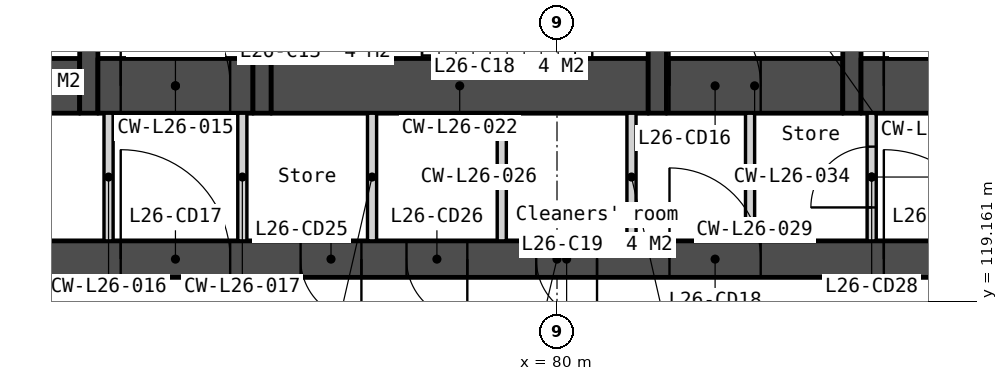
"""IFC4 building model, lengths in metres.
Left out: names, types, materials, properties, quantities, classifications, styles, units other than length and angle.
Written with IfcOpenShell. Run it as: python <this file> out.ifc"""

import sys

from ifc_helpers import new_model, si_unit, direction, frame, frame_2d, origin, place, context, subcontext, project, spatial, polyline, rectangle, outline, extrude, element, fill, save


model = new_model("IFC4")
c1 = context("Model", 3, precision=1e-05, world=origin(), true_north=direction((0.0, 1.0)))
c2 = subcontext(c1, "Body", "Model", "MODEL_VIEW")
j1 = project(units=[si_unit("LENGTHUNIT", "METRE"), si_unit("PLANEANGLEUNIT", "RADIAN")], contexts=[c1])
p1 = place(None, origin())
s1 = spatial("IfcSite", under=j1, at=p1, CompositionType="ELEMENT")
p2 = place(p1, origin())
s2 = spatial("IfcBuilding", under=s1, at=p2, CompositionType="ELEMENT")
p3 = place(p2, frame((0.0, 0.0, 106.3)))
s3 = spatial("IfcBuildingStorey", under=s2, at=p3, CompositionType="ELEMENT", Elevation=106.3)
p4 = place(p3, frame((66.0, 119.85, 0.0), z_axis=(0.0, 0.0, 1.0), x_axis=(1.0, 0.0, 0.0)))
e1 = element("IfcWall", 1, at=p4, inside=s3, PredefinedType="SOLIDWALL", context=c2, shape_type="SweptSolid", body=[
    extrude(rectangle(XDim=28.0, YDim=0.6, at=frame_2d((14.0, 0.0))), origin(), (0.0, 0.0, 1.0), 3.35),
])
p5 = place(p4, frame((6.825, 0.0, 0.0)))
e2 = element("IfcOpeningElement", 2, at=p5, cuts=e1, PredefinedType="OPENING", context=c2, shape_type="SweptSolid", body=[
    extrude(rectangle(XDim=1.8, YDim=2.1, at=frame_2d((0.9, 1.05))), frame((0.0, 0.31, 0.0), z_axis=(0.0, -1.0, 0.0), x_axis=(1.0, 0.0, 0.0)), (0.0, 0.0, 1.0), 0.62),
])
p6 = place(p4, frame((15.85, 0.0, 0.0)))
e3 = element("IfcOpeningElement", 3, at=p6, cuts=e1, PredefinedType="OPENING", context=c2, shape_type="SweptSolid", body=[
    extrude(rectangle(XDim=1.5, YDim=2.1, at=frame_2d((0.75, 1.05))), frame((0.0, 0.31, 0.0), z_axis=(0.0, -1.0, 0.0), x_axis=(1.0, 0.0, 0.0)), (0.0, 0.0, 1.0), 0.62),
])
p7 = place(p4, frame((19.375, 0.0, 0.0)))
e4 = element("IfcOpeningElement", 4, at=p7, cuts=e1, PredefinedType="OPENING", context=c2, shape_type="SweptSolid", body=[
    extrude(rectangle(XDim=1.8, YDim=2.1, at=frame_2d((0.9, 1.05))), frame((0.0, 0.31, 0.0), z_axis=(0.0, -1.0, 0.0), x_axis=(1.0, 0.0, 0.0)), (0.0, 0.0, 1.0), 0.62),
])
p8 = place(p4, frame((4.425, 0.0, 0.0)))
e5 = element("IfcOpeningElement", 5, at=p8, cuts=e1, PredefinedType="OPENING", context=c2, shape_type="SweptSolid", body=[
    extrude(rectangle(XDim=1.0, YDim=2.1, at=frame_2d((0.5, 1.05))), frame((0.0, 0.31, 0.0), z_axis=(0.0, -1.0, 0.0), x_axis=(1.0, 0.0, 0.0)), (0.0, 0.0, 1.0), 0.62),
])
p9 = place(p4, frame((9.783, 0.0, 0.0)))
e6 = element("IfcOpeningElement", 6, at=p9, cuts=e1, PredefinedType="OPENING", context=c2, shape_type="SweptSolid", body=[
    extrude(rectangle(XDim=1.0, YDim=2.1, at=frame_2d((0.5, 1.05))), frame((0.0, 0.31, 0.0), z_axis=(0.0, -1.0, 0.0), x_axis=(1.0, 0.0, 0.0)), (0.0, 0.0, 1.0), 0.62),
])
p10 = place(p4, frame((11.525, 0.0, 0.0)))
e7 = element("IfcOpeningElement", 7, at=p10, cuts=e1, PredefinedType="OPENING", context=c2, shape_type="SweptSolid", body=[
    extrude(rectangle(XDim=1.0, YDim=2.1, at=frame_2d((0.5, 1.05))), frame((0.0, 0.31, 0.0), z_axis=(0.0, -1.0, 0.0), x_axis=(1.0, 0.0, 0.0)), (0.0, 0.0, 1.0), 0.62),
])
p11 = place(p4, frame((13.658, 0.0, 0.0)))
e8 = element("IfcOpeningElement", 8, at=p11, cuts=e1, PredefinedType="OPENING", context=c2, shape_type="SweptSolid", body=[
    extrude(rectangle(XDim=1.0, YDim=2.1, at=frame_2d((0.5, 1.05))), frame((0.0, 0.31, 0.0), z_axis=(0.0, -1.0, 0.0), x_axis=(1.0, 0.0, 0.0)), (0.0, 0.0, 1.0), 0.62),
])
p12 = place(p4, frame((22.575, 0.0, 0.0)))
e9 = element("IfcOpeningElement", 9, at=p12, cuts=e1, PredefinedType="OPENING", context=c2, shape_type="SweptSolid", body=[
    extrude(rectangle(XDim=1.0, YDim=2.1, at=frame_2d((0.5, 1.05))), frame((0.0, 0.31, 0.0), z_axis=(0.0, -1.0, 0.0), x_axis=(1.0, 0.0, 0.0)), (0.0, 0.0, 1.0), 0.62),
])
p13 = place(p3, frame((69.6, 122.7, 0.0), z_axis=(0.0, 0.0, 1.0), x_axis=(1.0, 0.0, 0.0)))
e10 = element("IfcWall", 10, at=p13, inside=s3, PredefinedType="SOLIDWALL", context=c2, shape_type="SweptSolid", body=[
    extrude(rectangle(XDim=2.55, YDim=0.9, at=frame_2d((1.275, 0.0))), origin(), (0.0, 0.0, 1.0), 3.35),
])
p14 = place(p3, frame((72.3, 133.95, 0.0), z_axis=(0.0, 0.0, 1.0), x_axis=(0.0, -1.0, 0.0)))
e11 = element("IfcWall", 11, at=p14, inside=s3, PredefinedType="SOLIDWALL", context=c2, shape_type="SweptSolid", body=[
    extrude(rectangle(XDim=11.7, YDim=0.3, at=frame_2d((5.85, 0.0))), origin(), (0.0, 0.0, 1.0), 3.35),
])
p15 = place(p14, frame((6.95, 0.0, 0.0)))
e12 = element("IfcOpeningElement", 12, at=p15, cuts=e11, PredefinedType="OPENING", context=c2, shape_type="SweptSolid", body=[
    extrude(rectangle(XDim=1.1, YDim=2.1, at=frame_2d((0.55, 1.05))), frame((0.0, 0.16, 0.0), z_axis=(0.0, -1.0, 0.0), x_axis=(1.0, 0.0, 0.0)), (0.0, 0.0, 1.0), 0.32),
])
p16 = place(p14, frame((9.35, 0.0, 0.0)))
e13 = element("IfcOpeningElement", 13, at=p16, cuts=e11, PredefinedType="OPENING", context=c2, shape_type="SweptSolid", body=[
    extrude(rectangle(XDim=0.9, YDim=2.1, at=frame_2d((0.45, 1.05))), frame((0.0, 0.16, 0.0), z_axis=(0.0, -1.0, 0.0), x_axis=(1.0, 0.0, 0.0)), (0.0, 0.0, 1.0), 0.32),
])
p17 = place(p14, frame((5.1, 0.0, 0.0)))
e14 = element("IfcOpeningElement", 14, at=p17, cuts=e11, PredefinedType="OPENING", context=c2, shape_type="SweptSolid", body=[
    extrude(rectangle(XDim=1.0, YDim=2.1, at=frame_2d((0.5, 1.05))), frame((0.0, 0.16, 0.0), z_axis=(0.0, -1.0, 0.0), x_axis=(1.0, 0.0, 0.0)), (0.0, 0.0, 1.0), 0.32),
])
p18 = place(p3, frame((72.45, 122.7, 0.0), z_axis=(0.0, 0.0, 1.0), x_axis=(1.0, 0.0, 0.0)))
e15 = element("IfcWall", 15, at=p18, inside=s3, PredefinedType="SOLIDWALL", context=c2, shape_type="SweptSolid", body=[
    extrude(rectangle(XDim=2.55, YDim=0.9, at=frame_2d((1.275, 0.0))), origin(), (0.0, 0.0, 1.0), 3.35),
])
p19 = place(p18, frame((0.375, 0.0, 0.0)))
e16 = element("IfcOpeningElement", 16, at=p19, cuts=e15, PredefinedType="OPENING", context=c2, shape_type="SweptSolid", body=[
    extrude(rectangle(XDim=1.8, YDim=2.1, at=frame_2d((0.9, 1.05))), frame((0.0, 0.46, 0.0), z_axis=(0.0, -1.0, 0.0), x_axis=(1.0, 0.0, 0.0)), (0.0, 0.0, 1.0), 0.92),
])
for number, where, z_axis, x_axis in (
    (17, (72.625, 122.25, 0.0), (0.0, 0.0, 1.0), (0.0, -1.0, 0.0)),
    (18, (74.825, 122.25, 0.0), (0.0, 0.0, 1.0), (0.0, -1.0, 0.0)),
):
    element("IfcWall", number, at=place(p3, frame(where, z_axis=z_axis, x_axis=x_axis)), inside=s3, PredefinedType="PARTITIONING", context=c2, shape_type="SweptSolid", body=[
        extrude(rectangle(XDim=2.1, YDim=0.15, at=frame_2d((1.05, 0.0))), origin(), (0.0, 0.0, 1.0), 3.35),
    ])
p20 = place(p3, frame((75.15, 133.95, 0.0), z_axis=(0.0, 0.0, 1.0), x_axis=(0.0, -1.0, 0.0)))
e19 = element("IfcWall", 19, at=p20, inside=s3, PredefinedType="SOLIDWALL", context=c2, shape_type="SweptSolid", body=[
    extrude(rectangle(XDim=11.7, YDim=0.3, at=frame_2d((5.85, 0.0))), origin(), (0.0, 0.0, 1.0), 3.35),
])
p21 = place(p3, frame((75.3, 122.7, 0.0), z_axis=(0.0, 0.0, 1.0), x_axis=(1.0, 0.0, 0.0)))
e20 = element("IfcWall", 20, at=p21, inside=s3, PredefinedType="SOLIDWALL", context=c2, shape_type="SweptSolid", body=[
    extrude(rectangle(XDim=6.2, YDim=0.9, at=frame_2d((3.1, 0.0))), origin(), (0.0, 0.0, 1.0), 3.35),
])
for number, where, z_axis, x_axis in (
    (21, (76.958, 122.25, 0.0), (0.0, 0.0, 1.0), (0.0, -1.0, 0.0)),
    (22, (79.092, 122.25, 0.0), (0.0, 0.0, 1.0), (0.0, -1.0, 0.0)),
    (23, (81.225, 122.25, 0.0), (0.0, 0.0, 1.0), (0.0, -1.0, 0.0)),
):
    element("IfcWall", number, at=place(p3, frame(where, z_axis=z_axis, x_axis=x_axis)), inside=s3, PredefinedType="PARTITIONING", context=c2, shape_type="SweptSolid", body=[
        extrude(rectangle(XDim=2.1, YDim=0.15, at=frame_2d((1.05, 0.0))), origin(), (0.0, 0.0, 1.0), 3.35),
    ])
p22 = place(p3, frame((81.65, 125.7, 0.0), z_axis=(0.0, 0.0, 1.0), x_axis=(0.0, -1.0, 0.0)))
e24 = element("IfcWall", 24, at=p22, inside=s3, PredefinedType="SOLIDWALL", context=c2, shape_type="SweptSolid", body=[
    extrude(rectangle(XDim=3.45, YDim=0.3, at=frame_2d((1.725, 0.0))), origin(), (0.0, 0.0, 1.0), 3.35),
])
p23 = place(p22, frame((0.75, 0.0, 0.0)))
e25 = element("IfcOpeningElement", 25, at=p23, cuts=e24, PredefinedType="OPENING", context=c2, shape_type="SweptSolid", body=[
    extrude(rectangle(XDim=1.0, YDim=2.1, at=frame_2d((0.5, 1.05))), frame((0.0, 0.16, 0.0), z_axis=(0.0, -1.0, 0.0), x_axis=(1.0, 0.0, 0.0)), (0.0, 0.0, 1.0), 0.32),
])
p24 = place(p3, frame((81.8, 122.7, 0.0), z_axis=(0.0, 0.0, 1.0), x_axis=(1.0, 0.0, 0.0)))
e26 = element("IfcWall", 26, at=p24, inside=s3, PredefinedType="SOLIDWALL", context=c2, shape_type="SweptSolid", body=[
    extrude(rectangle(XDim=2.9, YDim=0.9, at=frame_2d((1.45, 0.0))), origin(), (0.0, 0.0, 1.0), 3.35),
])
p25 = place(p24, frame((0.05, 0.0, 0.0)))
e27 = element("IfcOpeningElement", 27, at=p25, cuts=e26, PredefinedType="OPENING", context=c2, shape_type="SweptSolid", body=[
    extrude(rectangle(XDim=1.5, YDim=2.1, at=frame_2d((0.75, 1.05))), frame((0.0, 0.46, 0.0), z_axis=(0.0, -1.0, 0.0), x_axis=(1.0, 0.0, 0.0)), (0.0, 0.0, 1.0), 0.92),
])
p26 = place(p3, frame((83.175, 122.25, 0.0), z_axis=(0.0, 0.0, 1.0), x_axis=(0.0, -1.0, 0.0)))
e28 = element("IfcWall", 28, at=p26, inside=s3, PredefinedType="PARTITIONING", context=c2, shape_type="SweptSolid", body=[
    extrude(rectangle(XDim=2.1, YDim=0.15, at=frame_2d((1.05, 0.0))), origin(), (0.0, 0.0, 1.0), 3.35),
])
p27 = place(p3, frame((84.85, 133.95, 0.0), z_axis=(0.0, 0.0, 1.0), x_axis=(0.0, -1.0, 0.0)))
e29 = element("IfcWall", 29, at=p27, inside=s3, PredefinedType="SOLIDWALL", context=c2, shape_type="SweptSolid", body=[
    extrude(rectangle(XDim=11.7, YDim=0.3, at=frame_2d((5.85, 0.0))), origin(), (0.0, 0.0, 1.0), 3.35),
])
p28 = place(p3, frame((85.0, 122.7, 0.0), z_axis=(0.0, 0.0, 1.0), x_axis=(1.0, 0.0, 0.0)))
e30 = element("IfcWall", 30, at=p28, inside=s3, PredefinedType="SOLIDWALL", context=c2, shape_type="SweptSolid", body=[
    extrude(rectangle(XDim=2.55, YDim=0.9, at=frame_2d((1.275, 0.0))), origin(), (0.0, 0.0, 1.0), 3.35),
])
p29 = place(p28, frame((0.375, 0.0, 0.0)))
e31 = element("IfcOpeningElement", 31, at=p29, cuts=e30, PredefinedType="OPENING", context=c2, shape_type="SweptSolid", body=[
    extrude(rectangle(XDim=1.8, YDim=2.1, at=frame_2d((0.9, 1.05))), frame((0.0, 0.46, 0.0), z_axis=(0.0, -1.0, 0.0), x_axis=(1.0, 0.0, 0.0)), (0.0, 0.0, 1.0), 0.92),
])
p30 = place(p3, frame((85.175, 122.25, 0.0), z_axis=(0.0, 0.0, 1.0), x_axis=(0.0, -1.0, 0.0)))
e32 = element("IfcWall", 32, at=p30, inside=s3, PredefinedType="PARTITIONING", context=c2, shape_type="SweptSolid", body=[
    extrude(rectangle(XDim=2.1, YDim=0.15, at=frame_2d((1.05, 0.0))), origin(), (0.0, 0.0, 1.0), 3.35),
])
p31 = place(p30, frame((0.55, 0.0, 0.0)))
e33 = element("IfcOpeningElement", 33, at=p31, cuts=e32, PredefinedType="OPENING", context=c2, shape_type="SweptSolid", body=[
    extrude(rectangle(XDim=1.0, YDim=2.1, at=frame_2d((0.5, 1.05))), frame((0.0, 0.085, 0.0), z_axis=(0.0, -1.0, 0.0), x_axis=(1.0, 0.0, 0.0)), (0.0, 0.0, 1.0), 0.17),
])
p32 = place(p3, frame((56.073, 130.263, -0.15), z_axis=(0.0, 0.0, 1.0), x_axis=(0.500000478905, -0.866025127289, 0.0)))
e34 = element("IfcWall", 34, at=p32, inside=s3, PredefinedType="SOLIDWALL", context=c2, shape_type="SweptSolid", body=[
    extrude(outline(polyline([(42.643, 0.0), (42.643, 3.5), (0.0, 3.5), (0.0, 0.0), (42.643, 0.0)])), frame((0.0, 0.225, 0.0), z_axis=(0.0, -1.0, 0.0), x_axis=(1.0, 0.0, 0.0)), (0.0, 0.0, 1.0), 0.45),
])
p33 = place(p32, frame((2.814, 0.0, 1.05)))
e35 = element("IfcOpeningElement", 35, at=p33, cuts=e34, PredefinedType="OPENING", context=c2, shape_type="SweptSolid", body=[
    extrude(rectangle(XDim=1.2, YDim=1.5, at=frame_2d((0.6, 0.75))), frame((0.0, 0.235, 0.0), z_axis=(0.0, -1.0, 0.0), x_axis=(1.0, 0.0, 0.0)), (0.0, 0.0, 1.0), 0.47),
])
p34 = place(p32, frame((4.514, 0.0, 1.05)))
e36 = element("IfcOpeningElement", 36, at=p34, cuts=e34, PredefinedType="OPENING", context=c2, shape_type="SweptSolid", body=[
    extrude(rectangle(XDim=1.2, YDim=1.5, at=frame_2d((0.6, 0.75))), frame((0.0, 0.235, 0.0), z_axis=(0.0, -1.0, 0.0), x_axis=(1.0, 0.0, 0.0)), (0.0, 0.0, 1.0), 0.47),
])
p35 = place(p32, frame((11.343, 0.0, 1.05)))
e37 = element("IfcOpeningElement", 37, at=p35, cuts=e34, PredefinedType="OPENING", context=c2, shape_type="SweptSolid", body=[
    extrude(rectangle(XDim=1.2, YDim=1.5, at=frame_2d((0.6, 0.75))), frame((0.0, 0.235, 0.0), z_axis=(0.0, -1.0, 0.0), x_axis=(1.0, 0.0, 0.0)), (0.0, 0.0, 1.0), 0.47),
])
p36 = place(p32, frame((13.043, 0.0, 1.05)))
e38 = element("IfcOpeningElement", 38, at=p36, cuts=e34, PredefinedType="OPENING", context=c2, shape_type="SweptSolid", body=[
    extrude(rectangle(XDim=1.2, YDim=1.5, at=frame_2d((0.6, 0.75))), frame((0.0, 0.235, 0.0), z_axis=(0.0, -1.0, 0.0), x_axis=(1.0, 0.0, 0.0)), (0.0, 0.0, 1.0), 0.47),
])
p37 = place(p32, frame((19.872, 0.0, 1.05)))
e39 = element("IfcOpeningElement", 39, at=p37, cuts=e34, PredefinedType="OPENING", context=c2, shape_type="SweptSolid", body=[
    extrude(rectangle(XDim=1.2, YDim=1.5, at=frame_2d((0.6, 0.75))), frame((0.0, 0.235, 0.0), z_axis=(0.0, -1.0, 0.0), x_axis=(1.0, 0.0, 0.0)), (0.0, 0.0, 1.0), 0.47),
])
p38 = place(p32, frame((21.572, 0.0, 1.05)))
e40 = element("IfcOpeningElement", 40, at=p38, cuts=e34, PredefinedType="OPENING", context=c2, shape_type="SweptSolid", body=[
    extrude(rectangle(XDim=1.2, YDim=1.5, at=frame_2d((0.6, 0.75))), frame((0.0, 0.235, 0.0), z_axis=(0.0, -1.0, 0.0), x_axis=(1.0, 0.0, 0.0)), (0.0, 0.0, 1.0), 0.47),
])
p39 = place(p32, frame((28.4, 0.0, 1.05)))
e41 = element("IfcOpeningElement", 41, at=p39, cuts=e34, PredefinedType="OPENING", context=c2, shape_type="SweptSolid", body=[
    extrude(rectangle(XDim=1.2, YDim=1.5, at=frame_2d((0.6, 0.75))), frame((0.0, 0.235, 0.0), z_axis=(0.0, -1.0, 0.0), x_axis=(1.0, 0.0, 0.0)), (0.0, 0.0, 1.0), 0.47),
])
p40 = place(p32, frame((30.1, 0.0, 1.05)))
e42 = element("IfcOpeningElement", 42, at=p40, cuts=e34, PredefinedType="OPENING", context=c2, shape_type="SweptSolid", body=[
    extrude(rectangle(XDim=1.2, YDim=1.5, at=frame_2d((0.6, 0.75))), frame((0.0, 0.235, 0.0), z_axis=(0.0, -1.0, 0.0), x_axis=(1.0, 0.0, 0.0)), (0.0, 0.0, 1.0), 0.47),
])
p41 = place(p32, frame((36.929, 0.0, 1.05)))
e43 = element("IfcOpeningElement", 43, at=p41, cuts=e34, PredefinedType="OPENING", context=c2, shape_type="SweptSolid", body=[
    extrude(rectangle(XDim=1.2, YDim=1.5, at=frame_2d((0.6, 0.75))), frame((0.0, 0.235, 0.0), z_axis=(0.0, -1.0, 0.0), x_axis=(1.0, 0.0, 0.0)), (0.0, 0.0, 1.0), 0.47),
])
p42 = place(p32, frame((38.629, 0.0, 1.05)))
e44 = element("IfcOpeningElement", 44, at=p42, cuts=e34, PredefinedType="OPENING", context=c2, shape_type="SweptSolid", body=[
    extrude(rectangle(XDim=1.2, YDim=1.5, at=frame_2d((0.6, 0.75))), frame((0.0, 0.235, 0.0), z_axis=(0.0, -1.0, 0.0), x_axis=(1.0, 0.0, 0.0)), (0.0, 0.0, 1.0), 0.47),
])
p43 = place(p3, frame((82.605, 93.333, -0.15), z_axis=(0.0, 0.0, 1.0), x_axis=(0.500000478905, 0.866025127289, 0.0)))
e45 = element("IfcWall", 45, at=p43, inside=s3, PredefinedType="SOLIDWALL", context=c2, shape_type="SweptSolid", body=[
    extrude(outline(polyline([(42.643, 0.0), (42.643, 3.5), (0.0, 3.5), (0.0, 0.0), (42.643, 0.0)])), frame((0.0, 0.225, 0.0), z_axis=(0.0, -1.0, 0.0), x_axis=(1.0, 0.0, 0.0)), (0.0, 0.0, 1.0), 0.45),
])
p44 = place(p43, frame((2.814, 0.0, 1.05)))
e46 = element("IfcOpeningElement", 46, at=p44, cuts=e45, PredefinedType="OPENING", context=c2, shape_type="SweptSolid", body=[
    extrude(rectangle(XDim=1.2, YDim=1.5, at=frame_2d((0.6, 0.75))), frame((0.0, 0.235, 0.0), z_axis=(0.0, -1.0, 0.0), x_axis=(1.0, 0.0, 0.0)), (0.0, 0.0, 1.0), 0.47),
])
p45 = place(p43, frame((4.514, 0.0, 1.05)))
e47 = element("IfcOpeningElement", 47, at=p45, cuts=e45, PredefinedType="OPENING", context=c2, shape_type="SweptSolid", body=[
    extrude(rectangle(XDim=1.2, YDim=1.5, at=frame_2d((0.6, 0.75))), frame((0.0, 0.235, 0.0), z_axis=(0.0, -1.0, 0.0), x_axis=(1.0, 0.0, 0.0)), (0.0, 0.0, 1.0), 0.47),
])
p46 = place(p43, frame((11.343, 0.0, 1.05)))
e48 = element("IfcOpeningElement", 48, at=p46, cuts=e45, PredefinedType="OPENING", context=c2, shape_type="SweptSolid", body=[
    extrude(rectangle(XDim=1.2, YDim=1.5, at=frame_2d((0.6, 0.75))), frame((0.0, 0.235, 0.0), z_axis=(0.0, -1.0, 0.0), x_axis=(1.0, 0.0, 0.0)), (0.0, 0.0, 1.0), 0.47),
])
p47 = place(p43, frame((13.043, 0.0, 1.05)))
e49 = element("IfcOpeningElement", 49, at=p47, cuts=e45, PredefinedType="OPENING", context=c2, shape_type="SweptSolid", body=[
    extrude(rectangle(XDim=1.2, YDim=1.5, at=frame_2d((0.6, 0.75))), frame((0.0, 0.235, 0.0), z_axis=(0.0, -1.0, 0.0), x_axis=(1.0, 0.0, 0.0)), (0.0, 0.0, 1.0), 0.47),
])
p48 = place(p43, frame((19.872, 0.0, 1.05)))
e50 = element("IfcOpeningElement", 50, at=p48, cuts=e45, PredefinedType="OPENING", context=c2, shape_type="SweptSolid", body=[
    extrude(rectangle(XDim=1.2, YDim=1.5, at=frame_2d((0.6, 0.75))), frame((0.0, 0.235, 0.0), z_axis=(0.0, -1.0, 0.0), x_axis=(1.0, 0.0, 0.0)), (0.0, 0.0, 1.0), 0.47),
])
p49 = place(p43, frame((21.572, 0.0, 1.05)))
e51 = element("IfcOpeningElement", 51, at=p49, cuts=e45, PredefinedType="OPENING", context=c2, shape_type="SweptSolid", body=[
    extrude(rectangle(XDim=1.2, YDim=1.5, at=frame_2d((0.6, 0.75))), frame((0.0, 0.235, 0.0), z_axis=(0.0, -1.0, 0.0), x_axis=(1.0, 0.0, 0.0)), (0.0, 0.0, 1.0), 0.47),
])
p50 = place(p43, frame((28.4, 0.0, 1.05)))
e52 = element("IfcOpeningElement", 52, at=p50, cuts=e45, PredefinedType="OPENING", context=c2, shape_type="SweptSolid", body=[
    extrude(rectangle(XDim=1.2, YDim=1.5, at=frame_2d((0.6, 0.75))), frame((0.0, 0.235, 0.0), z_axis=(0.0, -1.0, 0.0), x_axis=(1.0, 0.0, 0.0)), (0.0, 0.0, 1.0), 0.47),
])
p51 = place(p43, frame((30.1, 0.0, 1.05)))
e53 = element("IfcOpeningElement", 53, at=p51, cuts=e45, PredefinedType="OPENING", context=c2, shape_type="SweptSolid", body=[
    extrude(rectangle(XDim=1.2, YDim=1.5, at=frame_2d((0.6, 0.75))), frame((0.0, 0.235, 0.0), z_axis=(0.0, -1.0, 0.0), x_axis=(1.0, 0.0, 0.0)), (0.0, 0.0, 1.0), 0.47),
])
p52 = place(p43, frame((36.929, 0.0, 1.05)))
e54 = element("IfcOpeningElement", 54, at=p52, cuts=e45, PredefinedType="OPENING", context=c2, shape_type="SweptSolid", body=[
    extrude(rectangle(XDim=1.2, YDim=1.5, at=frame_2d((0.6, 0.75))), frame((0.0, 0.235, 0.0), z_axis=(0.0, -1.0, 0.0), x_axis=(1.0, 0.0, 0.0)), (0.0, 0.0, 1.0), 0.47),
])
p53 = place(p43, frame((38.629, 0.0, 1.05)))
e55 = element("IfcOpeningElement", 55, at=p53, cuts=e45, PredefinedType="OPENING", context=c2, shape_type="SweptSolid", body=[
    extrude(rectangle(XDim=1.2, YDim=1.5, at=frame_2d((0.6, 0.75))), frame((0.0, 0.235, 0.0), z_axis=(0.0, -1.0, 0.0), x_axis=(1.0, 0.0, 0.0)), (0.0, 0.0, 1.0), 0.47),
])
p54 = place(p29, origin())
e56 = element("IfcDoor", 56, at=p54, inside=s3, OperationType="DOUBLE_DOOR_DOUBLE_SWING", PredefinedType="DOOR", context=c2, shape_type="SweptSolid", body=[
    extrude(rectangle(XDim=1.8, YDim=2.1, at=frame_2d((0.9, 1.05))), frame((0.0, 0.025, 0.0), z_axis=(0.0, -1.0, 0.0), x_axis=(1.0, 0.0, 0.0)), (0.0, 0.0, 1.0), 0.05),
])
fill(e31, e56)
p55 = place(p19, origin())
e57 = element("IfcDoor", 57, at=p55, inside=s3, OperationType="DOUBLE_DOOR_DOUBLE_SWING", PredefinedType="DOOR", context=c2, shape_type="SweptSolid", body=[
    extrude(rectangle(XDim=1.8, YDim=2.1, at=frame_2d((0.9, 1.05))), frame((0.0, 0.025, 0.0), z_axis=(0.0, -1.0, 0.0), x_axis=(1.0, 0.0, 0.0)), (0.0, 0.0, 1.0), 0.05),
])
fill(e16, e57)
p56 = place(p25, origin())
e58 = element("IfcDoor", 58, at=p56, inside=s3, OperationType="DOUBLE_DOOR_DOUBLE_SWING", PredefinedType="DOOR", context=c2, shape_type="SweptSolid", body=[
    extrude(rectangle(XDim=1.5, YDim=2.1, at=frame_2d((0.75, 1.05))), frame((0.0, 0.025, 0.0), z_axis=(0.0, -1.0, 0.0), x_axis=(1.0, 0.0, 0.0)), (0.0, 0.0, 1.0), 0.05),
])
fill(e27, e58)
p57 = place(p5, origin())
e59 = element("IfcDoor", 59, at=p57, inside=s3, OperationType="DOUBLE_DOOR_DOUBLE_SWING", PredefinedType="DOOR", context=c2, shape_type="SweptSolid", body=[
    extrude(rectangle(XDim=1.8, YDim=2.1, at=frame_2d((0.9, 1.05))), frame((0.0, 0.025, 0.0), z_axis=(0.0, -1.0, 0.0), x_axis=(1.0, 0.0, 0.0)), (0.0, 0.0, 1.0), 0.05),
])
fill(e2, e59)
p58 = place(p6, origin())
e60 = element("IfcDoor", 60, at=p58, inside=s3, OperationType="DOUBLE_DOOR_DOUBLE_SWING", PredefinedType="DOOR", context=c2, shape_type="SweptSolid", body=[
    extrude(rectangle(XDim=1.5, YDim=2.1, at=frame_2d((0.75, 1.05))), frame((0.0, 0.025, 0.0), z_axis=(0.0, -1.0, 0.0), x_axis=(1.0, 0.0, 0.0)), (0.0, 0.0, 1.0), 0.05),
])
fill(e3, e60)
p59 = place(p7, origin())
e61 = element("IfcDoor", 61, at=p59, inside=s3, OperationType="DOUBLE_DOOR_DOUBLE_SWING", PredefinedType="DOOR", context=c2, shape_type="SweptSolid", body=[
    extrude(rectangle(XDim=1.8, YDim=2.1, at=frame_2d((0.9, 1.05))), frame((0.0, 0.025, 0.0), z_axis=(0.0, -1.0, 0.0), x_axis=(1.0, 0.0, 0.0)), (0.0, 0.0, 1.0), 0.05),
])
fill(e4, e61)
p60 = place(p9, origin())
e62 = element("IfcDoor", 62, at=p60, inside=s3, OperationType="SINGLE_SWING_RIGHT", PredefinedType="DOOR", context=c2, shape_type="SweptSolid", body=[
    extrude(rectangle(XDim=1.0, YDim=2.1, at=frame_2d((0.5, 1.05))), frame((0.0, 0.025, 0.0), z_axis=(0.0, -1.0, 0.0), x_axis=(1.0, 0.0, 0.0)), (0.0, 0.0, 1.0), 0.05),
])
fill(e6, e62)
p61 = place(p10, origin())
e63 = element("IfcDoor", 63, at=p61, inside=s3, OperationType="SINGLE_SWING_RIGHT", PredefinedType="DOOR", context=c2, shape_type="SweptSolid", body=[
    extrude(rectangle(XDim=1.0, YDim=2.1, at=frame_2d((0.5, 1.05))), frame((0.0, 0.025, 0.0), z_axis=(0.0, -1.0, 0.0), x_axis=(1.0, 0.0, 0.0)), (0.0, 0.0, 1.0), 0.05),
])
fill(e7, e63)
p62 = place(p11, origin())
e64 = element("IfcDoor", 64, at=p62, inside=s3, OperationType="SINGLE_SWING_RIGHT", PredefinedType="DOOR", context=c2, shape_type="SweptSolid", body=[
    extrude(rectangle(XDim=1.0, YDim=2.1, at=frame_2d((0.5, 1.05))), frame((0.0, 0.025, 0.0), z_axis=(0.0, -1.0, 0.0), x_axis=(1.0, 0.0, 0.0)), (0.0, 0.0, 1.0), 0.05),
])
fill(e8, e64)
p63 = place(p31, origin())
e65 = element("IfcDoor", 65, at=p63, inside=s3, OperationType="SINGLE_SWING_RIGHT", PredefinedType="DOOR", context=c2, shape_type="SweptSolid", body=[
    extrude(rectangle(XDim=1.0, YDim=2.1, at=frame_2d((0.5, 1.05))), frame((0.0, 0.025, 0.0), z_axis=(0.0, -1.0, 0.0), x_axis=(1.0, 0.0, 0.0)), (0.0, 0.0, 1.0), 0.05),
])
fill(e33, e65)
save(model, sys.argv[1])
